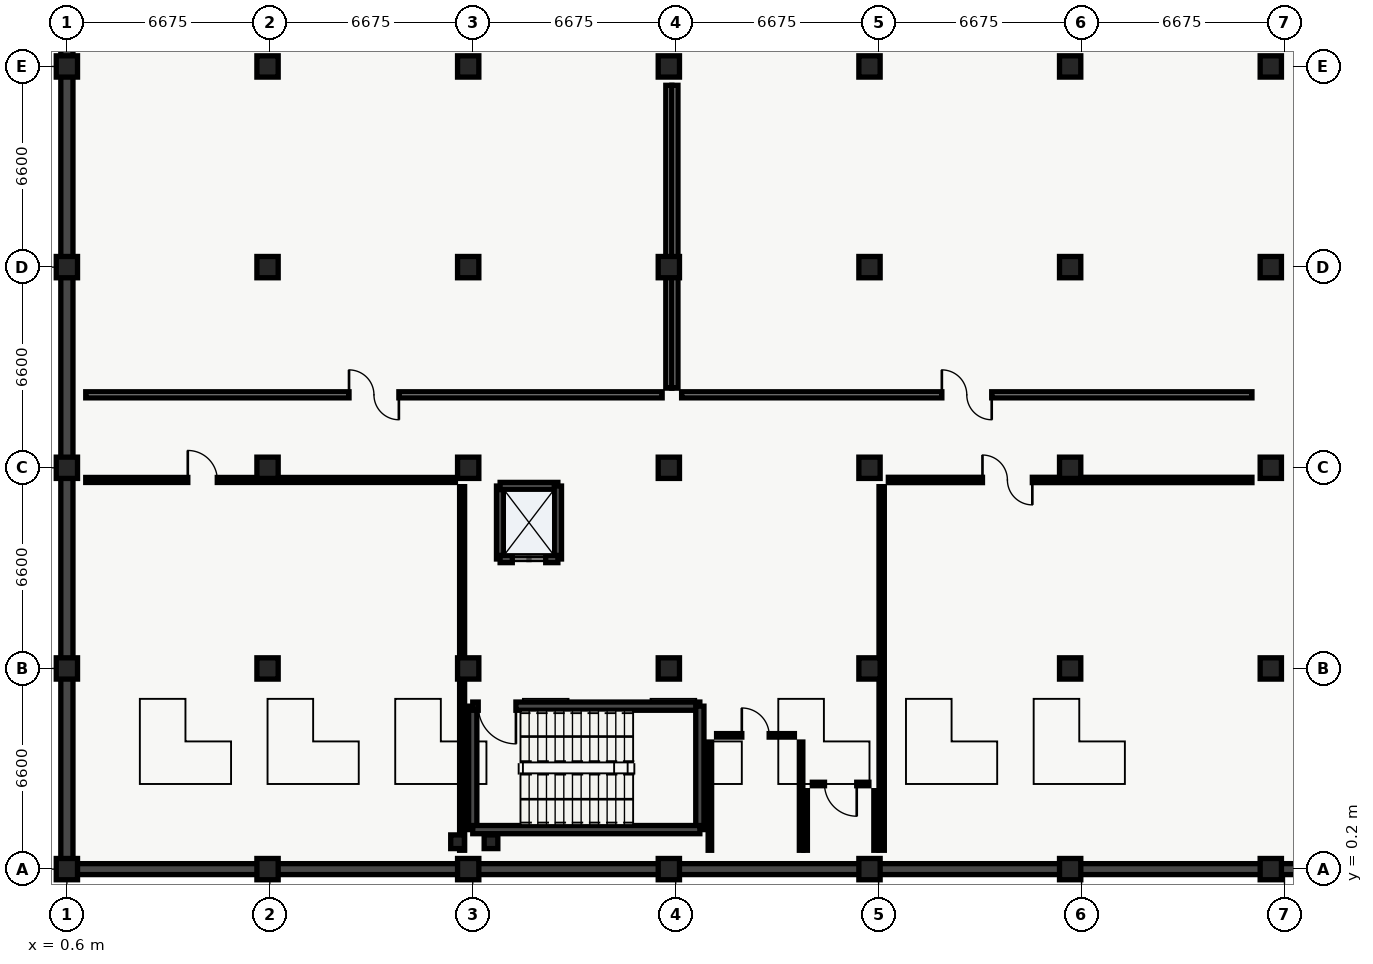
"""IFC4 building model, lengths in metres.
Left out: names, types, materials, properties, quantities, classifications, styles, units other than length and angle.
Written with IfcOpenShell. Run it as: python <this file> out.ifc"""

import sys

from ifc_helpers import new_model, si_unit, direction, frame, frame_2d, origin, origin_2d, place, context, subcontext, project, spatial, rectangle, extrude, element, fill, save


model = new_model("IFC4")
c1 = context("Model", 3, precision=1e-05, world=origin(), true_north=direction((0.0, 1.0)))
c2 = subcontext(c1, "Body", "Model", "MODEL_VIEW")
j1 = project(units=[si_unit("LENGTHUNIT", "METRE"), si_unit("PLANEANGLEUNIT", "RADIAN")], contexts=[c1])
p1 = place(None, origin())
s1 = spatial("IfcSite", under=j1, at=p1, CompositionType="ELEMENT")
p2 = place(p1, origin())
s2 = spatial("IfcBuilding", under=s1, at=p2, CompositionType="ELEMENT")
p3 = place(p2, frame((0.0, 0.0, -4.8)))
s3 = spatial("IfcBuildingStorey", under=s2, at=p3, CompositionType="ELEMENT", Elevation=-4.8)
for number, where, z_axis, x_axis in (
    (1, (0.6, 0.2, 0.0), (0.0, 0.0, 1.0), (1.0, 0.0, 0.0)),
    (2, (0.6, 6.8, 0.0), (0.0, 0.0, 1.0), (1.0, 0.0, 0.0)),
    (3, (0.6, 13.4, 0.0), (0.0, 0.0, 1.0), (1.0, 0.0, 0.0)),
    (4, (0.6, 20.0, 0.0), (0.0, 0.0, 1.0), (1.0, 0.0, 0.0)),
    (5, (0.6, 26.6, 0.0), (0.0, 0.0, 1.0), (1.0, 0.0, 0.0)),
    (6, (7.2, 0.2, 0.0), (0.0, 0.0, 1.0), (1.0, 0.0, 0.0)),
    (7, (7.2, 6.8, 0.0), (0.0, 0.0, 1.0), (1.0, 0.0, 0.0)),
    (8, (7.2, 13.4, 0.0), (0.0, 0.0, 1.0), (1.0, 0.0, 0.0)),
    (9, (7.2, 20.0, 0.0), (0.0, 0.0, 1.0), (1.0, 0.0, 0.0)),
    (10, (7.2, 26.6, 0.0), (0.0, 0.0, 1.0), (1.0, 0.0, 0.0)),
    (11, (13.8, 0.2, 0.0), (0.0, 0.0, 1.0), (1.0, 0.0, 0.0)),
    (12, (13.8, 6.8, 0.0), (0.0, 0.0, 1.0), (1.0, 0.0, 0.0)),
    (13, (13.8, 13.4, 0.0), (0.0, 0.0, 1.0), (1.0, 0.0, 0.0)),
    (14, (13.8, 20.0, 0.0), (0.0, 0.0, 1.0), (1.0, 0.0, 0.0)),
    (15, (13.8, 26.6, 0.0), (0.0, 0.0, 1.0), (1.0, 0.0, 0.0)),
    (16, (20.4, 0.2, 0.0), (0.0, 0.0, 1.0), (1.0, 0.0, 0.0)),
    (17, (20.4, 6.8, 0.0), (0.0, 0.0, 1.0), (1.0, 0.0, 0.0)),
    (18, (20.4, 13.4, 0.0), (0.0, 0.0, 1.0), (1.0, 0.0, 0.0)),
    (19, (20.4, 20.0, 0.0), (0.0, 0.0, 1.0), (1.0, 0.0, 0.0)),
    (20, (20.4, 26.6, 0.0), (0.0, 0.0, 1.0), (1.0, 0.0, 0.0)),
    (21, (27.0, 0.2, 0.0), (0.0, 0.0, 1.0), (1.0, 0.0, 0.0)),
    (22, (27.0, 6.8, 0.0), (0.0, 0.0, 1.0), (1.0, 0.0, 0.0)),
    (23, (27.0, 13.4, 0.0), (0.0, 0.0, 1.0), (1.0, 0.0, 0.0)),
    (24, (27.0, 20.0, 0.0), (0.0, 0.0, 1.0), (1.0, 0.0, 0.0)),
    (25, (27.0, 26.6, 0.0), (0.0, 0.0, 1.0), (1.0, 0.0, 0.0)),
    (26, (33.6, 0.2, 0.0), (0.0, 0.0, 1.0), (1.0, 0.0, 0.0)),
    (27, (33.6, 6.8, 0.0), (0.0, 0.0, 1.0), (1.0, 0.0, 0.0)),
    (28, (33.6, 13.4, 0.0), (0.0, 0.0, 1.0), (1.0, 0.0, 0.0)),
    (29, (33.6, 20.0, 0.0), (0.0, 0.0, 1.0), (1.0, 0.0, 0.0)),
    (30, (33.6, 26.6, 0.0), (0.0, 0.0, 1.0), (1.0, 0.0, 0.0)),
    (31, (40.2, 0.2, 0.0), (0.0, 0.0, 1.0), (1.0, 0.0, 0.0)),
    (32, (40.2, 6.8, 0.0), (0.0, 0.0, 1.0), (1.0, 0.0, 0.0)),
    (33, (40.2, 13.4, 0.0), (0.0, 0.0, 1.0), (1.0, 0.0, 0.0)),
    (34, (40.2, 20.0, 0.0), (0.0, 0.0, 1.0), (1.0, 0.0, 0.0)),
    (35, (40.2, 26.6, 0.0), (0.0, 0.0, 1.0), (1.0, 0.0, 0.0)),
):
    element("IfcColumn", number, at=place(p3, frame(where, z_axis=z_axis, x_axis=x_axis)), inside=s3, PredefinedType="COLUMN", context=c2, shape_type="SweptSolid", body=[
        extrude(rectangle(XDim=0.7, YDim=0.7, at=origin_2d()), origin(), (0.0, 0.0, 1.0), 4.6),
    ])
for number, where, z_axis, x_axis in (
    (36, (13.45, 1.1, 0.0), (0.0, 0.0, 1.0), (1.0, 0.0, 0.0)),
    (37, (14.55, 1.1, 0.0), (0.0, 0.0, 1.0), (1.0, 0.0, 0.0)),
):
    element("IfcColumn", number, at=place(p3, frame(where, z_axis=z_axis, x_axis=x_axis)), inside=s3, PredefinedType="COLUMN", context=c2, shape_type="SweptSolid", body=[
        extrude(rectangle(XDim=0.45, YDim=0.45, at=origin_2d()), origin(), (0.0, 0.0, 1.0), 4.74),
    ])
p4 = place(p3, frame((0.6, 0.2, 0.0), z_axis=(0.0, 0.0, 1.0), x_axis=(0.0, 1.0, 0.0)))
e38 = element("IfcWall", 38, at=p4, inside=s3, PredefinedType="USERDEFINED", context=c2, shape_type="SweptSolid", body=[
    extrude(rectangle(XDim=61.4, YDim=0.4, at=frame_2d((30.7, 0.0))), origin(), (0.0, 0.0, 1.0), 4.58),
])
p5 = place(p3, frame((160.8, 0.2, 0.0), z_axis=(0.0, 0.0, 1.0), x_axis=(-1.0, 0.0, 0.0)))
e39 = element("IfcWall", 39, at=p5, inside=s3, PredefinedType="USERDEFINED", context=c2, shape_type="SweptSolid", body=[
    extrude(rectangle(XDim=160.2, YDim=0.36, at=frame_2d((80.1, 0.0))), origin(), (0.0, 0.0, 1.0), 4.58),
])
p6 = place(p3, frame((13.95, 1.5, 0.0), z_axis=(0.0, 0.0, 1.0), x_axis=(0.0, 1.0, 0.0)))
e40 = element("IfcWall", 40, at=p6, inside=s3, PredefinedType="SHEAR", context=c2, shape_type="SweptSolid", body=[
    extrude(rectangle(XDim=4.06, YDim=0.27, at=frame_2d((2.03, 0.0))), origin(), (0.0, 0.0, 1.0), 4.58),
])
p7 = place(p3, frame((13.95, 5.56, 0.0), z_axis=(0.0, 0.0, 1.0), x_axis=(1.0, 0.0, 0.0)))
e41 = element("IfcWall", 41, at=p7, inside=s3, PredefinedType="SHEAR", context=c2, shape_type="SweptSolid", body=[
    extrude(rectangle(XDim=7.47, YDim=0.27, at=frame_2d((3.735, 0.0))), origin(), (0.0, 0.0, 1.0), 4.58),
])
p8 = place(p7, frame((0.18, 0.0, 0.0)))
e42 = element("IfcOpeningElement", 42, at=p8, cuts=e41, PredefinedType="OPENING", context=c2, shape_type="SweptSolid", body=[
    extrude(rectangle(XDim=1.24, YDim=2.15, at=frame_2d((0.62, 1.075))), frame((0.0, 0.135, 0.0), z_axis=(0.0, -1.0, 0.0), x_axis=(1.0, 0.0, 0.0)), (0.0, 0.0, 1.0), 0.27),
])
p9 = place(p3, frame((21.42, 5.56, 0.0), z_axis=(0.0, 0.0, 1.0), x_axis=(0.0, -1.0, 0.0)))
e43 = element("IfcWall", 43, at=p9, inside=s3, PredefinedType="SHEAR", context=c2, shape_type="SweptSolid", body=[
    extrude(rectangle(XDim=4.06, YDim=0.27, at=frame_2d((2.03, 0.0))), origin(), (0.0, 0.0, 1.0), 4.58),
])
p10 = place(p3, frame((21.42, 1.5, 0.0), z_axis=(0.0, 0.0, 1.0), x_axis=(-1.0, 0.0, 0.0)))
e44 = element("IfcWall", 44, at=p10, inside=s3, PredefinedType="SHEAR", context=c2, shape_type="SweptSolid", body=[
    extrude(rectangle(XDim=7.47, YDim=0.27, at=frame_2d((3.735, 0.0))), origin(), (0.0, 0.0, 1.0), 4.58),
])
p11 = place(p3, frame((14.85, 10.4, 0.0), z_axis=(0.0, 0.0, 1.0), x_axis=(0.0, 1.0, 0.0)))
e45 = element("IfcWall", 45, at=p11, inside=s3, PredefinedType="SHEAR", context=c2, shape_type="SweptSolid", body=[
    extrude(rectangle(XDim=2.4, YDim=0.24, at=frame_2d((1.2, 0.0))), origin(), (0.0, 0.0, 1.0), 4.58),
])
p12 = place(p3, frame((14.85, 12.8, 0.0), z_axis=(0.0, 0.0, 1.0), x_axis=(1.0, 0.0, 0.0)))
e46 = element("IfcWall", 46, at=p12, inside=s3, PredefinedType="SHEAR", context=c2, shape_type="SweptSolid", body=[
    extrude(rectangle(XDim=1.9, YDim=0.24, at=frame_2d((0.95, 0.0))), origin(), (0.0, 0.0, 1.0), 4.58),
])
p13 = place(p3, frame((16.75, 12.8, 0.0), z_axis=(0.0, 0.0, 1.0), x_axis=(0.0, -1.0, 0.0)))
e47 = element("IfcWall", 47, at=p13, inside=s3, PredefinedType="SHEAR", context=c2, shape_type="SweptSolid", body=[
    extrude(rectangle(XDim=2.4, YDim=0.24, at=frame_2d((1.2, 0.0))), origin(), (0.0, 0.0, 1.0), 4.58),
])
p14 = place(p3, frame((16.75, 10.4, 0.0), z_axis=(0.0, 0.0, 1.0), x_axis=(-1.0, 0.0, 0.0)))
e48 = element("IfcWall", 48, at=p14, inside=s3, PredefinedType="SHEAR", context=c2, shape_type="SweptSolid", body=[
    extrude(rectangle(XDim=1.9, YDim=0.24, at=frame_2d((0.95, 0.0))), origin(), (0.0, 0.0, 1.0), 4.58),
])
p15 = place(p14, frame((0.4, 0.0, 0.0)))
e49 = element("IfcOpeningElement", 49, at=p15, cuts=e48, PredefinedType="OPENING", context=c2, shape_type="SweptSolid", body=[
    extrude(rectangle(XDim=1.1, YDim=2.2, at=frame_2d((0.55, 1.1))), frame((0.0, 0.12, 0.0), z_axis=(0.0, -1.0, 0.0), x_axis=(1.0, 0.0, 0.0)), (0.0, 0.0, 1.0), 0.24),
])
p16 = place(p3, frame((24.75, 0.82, 0.0), z_axis=(0.0, 0.0, 1.0), x_axis=(0.0, 1.0, 0.0)))
e50 = element("IfcWall", 50, at=p16, inside=s3, PredefinedType="PARTITIONING", context=c2, shape_type="SweptSolid", body=[
    extrude(rectangle(XDim=3.56, YDim=0.115, at=frame_2d((1.78, 0.0))), origin(), (0.0, 0.0, 1.0), 4.25),
])
p17 = place(p3, frame((24.53, 4.6, 0.0), z_axis=(0.0, 0.0, 1.0), x_axis=(-1.0, 0.0, 0.0)))
e51 = element("IfcWall", 51, at=p17, inside=s3, PredefinedType="PARTITIONING", context=c2, shape_type="SweptSolid", body=[
    extrude(rectangle(XDim=2.56, YDim=0.115, at=frame_2d((1.28, 0.0))), origin(), (0.0, 0.0, 1.0), 4.25),
])
p18 = place(p17, frame((0.83, 0.0, 0.0)))
e52 = element("IfcOpeningElement", 52, at=p18, cuts=e51, PredefinedType="OPENING", context=c2, shape_type="SweptSolid", body=[
    extrude(rectangle(XDim=0.9, YDim=2.1, at=frame_2d((0.45, 1.05))), frame((0.0, 0.058, 0.0), z_axis=(0.0, -1.0, 0.0), x_axis=(1.0, 0.0, 0.0)), (0.0, 0.0, 1.0), 0.115),
])
p19 = place(p3, frame((21.75, 4.38, 0.0), z_axis=(0.0, 0.0, 1.0), x_axis=(0.0, -1.0, 0.0)))
e53 = element("IfcWall", 53, at=p19, inside=s3, PredefinedType="PARTITIONING", context=c2, shape_type="SweptSolid", body=[
    extrude(rectangle(XDim=3.56, YDim=0.115, at=frame_2d((1.78, 0.0))), origin(), (0.0, 0.0, 1.0), 4.25),
])
p20 = place(p3, frame((27.2, 0.82, 0.0), z_axis=(0.0, 0.0, 1.0), x_axis=(0.0, 1.0, 0.0)))
e54 = element("IfcWall", 54, at=p20, inside=s3, PredefinedType="PARTITIONING", context=c2, shape_type="SweptSolid", body=[
    extrude(rectangle(XDim=1.96, YDim=0.115, at=frame_2d((0.98, 0.0))), origin(), (0.0, 0.0, 1.0), 3.935),
])
p21 = place(p3, frame((26.98, 3.0, 0.0), z_axis=(0.0, 0.0, 1.0), x_axis=(-1.0, 0.0, 0.0)))
e55 = element("IfcWall", 55, at=p21, inside=s3, PredefinedType="PARTITIONING", context=c2, shape_type="SweptSolid", body=[
    extrude(rectangle(XDim=1.86, YDim=0.115, at=frame_2d((0.93, 0.0))), origin(), (0.0, 0.0, 1.0), 4.25),
])
p22 = place(p21, frame((0.4, 0.0, 0.0)))
e56 = element("IfcOpeningElement", 56, at=p22, cuts=e55, PredefinedType="OPENING", context=c2, shape_type="SweptSolid", body=[
    extrude(rectangle(XDim=1.06, YDim=2.12, at=frame_2d((0.53, 1.06))), frame((0.0, 0.058, 0.0), z_axis=(0.0, -1.0, 0.0), x_axis=(1.0, 0.0, 0.0)), (0.0, 0.0, 1.0), 0.115),
])
p23 = place(p3, frame((24.9, 2.78, 0.0), z_axis=(0.0, 0.0, 1.0), x_axis=(0.0, -1.0, 0.0)))
e57 = element("IfcWall", 57, at=p23, inside=s3, PredefinedType="PARTITIONING", context=c2, shape_type="SweptSolid", body=[
    extrude(rectangle(XDim=1.96, YDim=0.115, at=frame_2d((0.98, 0.0))), origin(), (0.0, 0.0, 1.0), 4.25),
])
p24 = place(p3, frame((1.22, 15.8, 0.0), z_axis=(0.0, 0.0, 1.0), x_axis=(1.0, 0.0, 0.0)))
e58 = element("IfcWall", 58, at=p24, inside=s3, PredefinedType="SOLIDWALL", context=c2, shape_type="SweptSolid", body=[
    extrude(rectangle(XDim=18.96, YDim=0.2, at=frame_2d((9.48, 0.0))), origin(), (0.0, 0.0, 1.0), 4.135),
])
p25 = place(p24, frame((8.66, 0.0, 0.0)))
e59 = element("IfcOpeningElement", 59, at=p25, cuts=e58, PredefinedType="OPENING", context=c2, shape_type="SweptSolid", body=[
    extrude(rectangle(XDim=1.64, YDim=2.2, at=frame_2d((0.82, 1.1))), frame((0.0, 0.1, 0.0), z_axis=(0.0, -1.0, 0.0), x_axis=(1.0, 0.0, 0.0)), (0.0, 0.0, 1.0), 0.2),
])
p26 = place(p3, frame((20.4, 16.02, 0.0), z_axis=(0.0, 0.0, 1.0), x_axis=(0.0, 1.0, 0.0)))
e60 = element("IfcWall", 60, at=p26, inside=s3, PredefinedType="SOLIDWALL", context=c2, shape_type="SweptSolid", body=[
    extrude(rectangle(XDim=9.96, YDim=0.2, at=frame_2d((4.98, 0.0))), origin(), (0.0, 0.0, 1.0), 3.935),
])
p27 = place(p3, frame((20.82, 15.8, 0.0), z_axis=(0.0, 0.0, 1.0), x_axis=(1.0, 0.0, 0.0)))
e61 = element("IfcWall", 61, at=p27, inside=s3, PredefinedType="SOLIDWALL", context=c2, shape_type="SweptSolid", body=[
    extrude(rectangle(XDim=18.76, YDim=0.2, at=frame_2d((9.38, 0.0))), origin(), (0.0, 0.0, 1.0), 4.135),
])
p28 = place(p27, frame((8.56, 0.0, 0.0)))
e62 = element("IfcOpeningElement", 62, at=p28, cuts=e61, PredefinedType="OPENING", context=c2, shape_type="SweptSolid", body=[
    extrude(rectangle(XDim=1.64, YDim=2.2, at=frame_2d((0.82, 1.1))), frame((0.0, 0.1, 0.0), z_axis=(0.0, -1.0, 0.0), x_axis=(1.0, 0.0, 0.0)), (0.0, 0.0, 1.0), 0.2),
])
p29 = place(p3, frame((20.6, 25.98, 0.0), z_axis=(0.0, 0.0, 1.0), x_axis=(0.0, -1.0, 0.0)))
e63 = element("IfcWall", 63, at=p29, inside=s3, PredefinedType="SOLIDWALL", context=c2, shape_type="SweptSolid", body=[
    extrude(rectangle(XDim=9.96, YDim=0.2, at=frame_2d((4.98, 0.0))), origin(), (0.0, 0.0, 1.0), 3.935),
])
p30 = place(p3, frame((13.6, 0.82, 0.0), z_axis=(0.0, 0.0, 1.0), x_axis=(0.0, 1.0, 0.0)))
e64 = element("IfcWall", 64, at=p30, inside=s3, PredefinedType="PARTITIONING", context=c2, shape_type="SweptSolid", body=[
    extrude(rectangle(XDim=11.96, YDim=0.165, at=frame_2d((5.98, 0.0))), origin(), (0.0, 0.0, 1.0), 3.935),
])
p31 = place(p3, frame((13.38, 13.0, 0.0), z_axis=(0.0, 0.0, 1.0), x_axis=(-1.0, 0.0, 0.0)))
e65 = element("IfcWall", 65, at=p31, inside=s3, PredefinedType="PARTITIONING", context=c2, shape_type="SweptSolid", body=[
    extrude(rectangle(XDim=12.16, YDim=0.165, at=frame_2d((6.08, 0.0))), origin(), (0.0, 0.0, 1.0), 4.25),
])
p32 = place(p31, frame((7.833, 0.0, 0.0)))
e66 = element("IfcOpeningElement", 66, at=p32, cuts=e65, PredefinedType="OPENING", context=c2, shape_type="SweptSolid", body=[
    extrude(rectangle(XDim=0.97, YDim=2.12, at=frame_2d((0.485, 1.06))), frame((0.0, 0.083, 0.0), z_axis=(0.0, -1.0, 0.0), x_axis=(1.0, 0.0, 0.0)), (0.0, 0.0, 1.0), 0.165),
])
p33 = place(p3, frame((39.58, 13.0, 0.0), z_axis=(0.0, 0.0, 1.0), x_axis=(-1.0, 0.0, 0.0)))
e67 = element("IfcWall", 67, at=p33, inside=s3, PredefinedType="SOLIDWALL", context=c2, shape_type="SweptSolid", body=[
    extrude(rectangle(XDim=11.96, YDim=0.175, at=frame_2d((5.98, 0.0))), origin(), (0.0, 0.0, 1.0), 4.25),
])
p34 = place(p33, frame((7.224, 0.0, 0.0)))
e68 = element("IfcOpeningElement", 68, at=p34, cuts=e67, PredefinedType="OPENING", context=c2, shape_type="SweptSolid", body=[
    extrude(rectangle(XDim=1.64, YDim=2.2, at=frame_2d((0.82, 1.1))), frame((0.0, 0.087, 0.0), z_axis=(0.0, -1.0, 0.0), x_axis=(1.0, 0.0, 0.0)), (0.0, 0.0, 1.0), 0.175),
])
p35 = place(p3, frame((27.4, 12.78, 0.0), z_axis=(0.0, 0.0, 1.0), x_axis=(0.0, -1.0, 0.0)))
e69 = element("IfcWall", 69, at=p35, inside=s3, PredefinedType="SOLIDWALL", context=c2, shape_type="SweptSolid", body=[
    extrude(rectangle(XDim=11.96, YDim=0.175, at=frame_2d((5.98, 0.0))), origin(), (0.0, 0.0, 1.0), 4.25),
])
p36 = place(p8, origin())
e70 = element("IfcDoor", 70, at=p36, inside=s3, OperationType="SINGLE_SWING_RIGHT", PredefinedType="DOOR", context=c2, shape_type="SweptSolid", body=[
    extrude(rectangle(XDim=1.24, YDim=2.15, at=frame_2d((0.62, 1.075))), frame((0.0, 0.025, 0.0), z_axis=(0.0, -1.0, 0.0), x_axis=(1.0, 0.0, 0.0)), (0.0, 0.0, 1.0), 0.05),
])
fill(e42, e70)
p37 = place(p15, origin())
e71 = element("IfcDoor", 71, at=p37, inside=s3, OperationType="SLIDING_TO_LEFT", PredefinedType="DOOR", context=c2, shape_type="SweptSolid", body=[
    extrude(rectangle(XDim=1.1, YDim=2.2, at=frame_2d((0.55, 1.1))), frame((0.0, 0.025, 0.0), z_axis=(0.0, -1.0, 0.0), x_axis=(1.0, 0.0, 0.0)), (0.0, 0.0, 1.0), 0.05),
])
fill(e49, e71)
p38 = place(p18, origin())
e72 = element("IfcDoor", 72, at=p38, inside=s3, OperationType="SINGLE_SWING_RIGHT", PredefinedType="DOOR", context=c2, shape_type="SweptSolid", body=[
    extrude(rectangle(XDim=0.9, YDim=2.1, at=frame_2d((0.45, 1.05))), frame((0.0, 0.025, 0.0), z_axis=(0.0, -1.0, 0.0), x_axis=(1.0, 0.0, 0.0)), (0.0, 0.0, 1.0), 0.05),
])
fill(e52, e72)
p39 = place(p22, origin())
e73 = element("IfcDoor", 73, at=p39, inside=s3, OperationType="SINGLE_SWING_LEFT", PredefinedType="DOOR", context=c2, shape_type="SweptSolid", body=[
    extrude(rectangle(XDim=1.06, YDim=2.12, at=frame_2d((0.53, 1.06))), frame((0.0, 0.025, 0.0), z_axis=(0.0, -1.0, 0.0), x_axis=(1.0, 0.0, 0.0)), (0.0, 0.0, 1.0), 0.05),
])
fill(e56, e73)
p40 = place(p25, origin())
e74 = element("IfcDoor", 74, at=p40, inside=s3, OperationType="DOUBLE_DOOR_SINGLE_SWING", PredefinedType="DOOR", context=c2, shape_type="SweptSolid", body=[
    extrude(rectangle(XDim=1.64, YDim=2.2, at=frame_2d((0.82, 1.1))), frame((0.0, 0.025, 0.0), z_axis=(0.0, -1.0, 0.0), x_axis=(1.0, 0.0, 0.0)), (0.0, 0.0, 1.0), 0.05),
])
fill(e59, e74)
p41 = place(p28, origin())
e75 = element("IfcDoor", 75, at=p41, inside=s3, OperationType="DOUBLE_DOOR_SINGLE_SWING", PredefinedType="DOOR", context=c2, shape_type="SweptSolid", body=[
    extrude(rectangle(XDim=1.64, YDim=2.2, at=frame_2d((0.82, 1.1))), frame((0.0, 0.025, 0.0), z_axis=(0.0, -1.0, 0.0), x_axis=(1.0, 0.0, 0.0)), (0.0, 0.0, 1.0), 0.05),
])
fill(e62, e75)
p42 = place(p32, origin())
e76 = element("IfcDoor", 76, at=p42, inside=s3, OperationType="SINGLE_SWING_RIGHT", PredefinedType="DOOR", context=c2, shape_type="SweptSolid", body=[
    extrude(rectangle(XDim=0.97, YDim=2.12, at=frame_2d((0.485, 1.06))), frame((0.0, 0.025, 0.0), z_axis=(0.0, -1.0, 0.0), x_axis=(1.0, 0.0, 0.0)), (0.0, 0.0, 1.0), 0.05),
])
fill(e66, e76)
p43 = place(p34, origin())
e77 = element("IfcDoor", 77, at=p43, inside=s3, OperationType="DOUBLE_DOOR_SINGLE_SWING", PredefinedType="DOOR", context=c2, shape_type="SweptSolid", body=[
    extrude(rectangle(XDim=1.64, YDim=2.2, at=frame_2d((0.82, 1.1))), frame((0.0, 0.025, 0.0), z_axis=(0.0, -1.0, 0.0), x_axis=(1.0, 0.0, 0.0)), (0.0, 0.0, 1.0), 0.05),
])
fill(e68, e77)
save(model, sys.argv[1])
